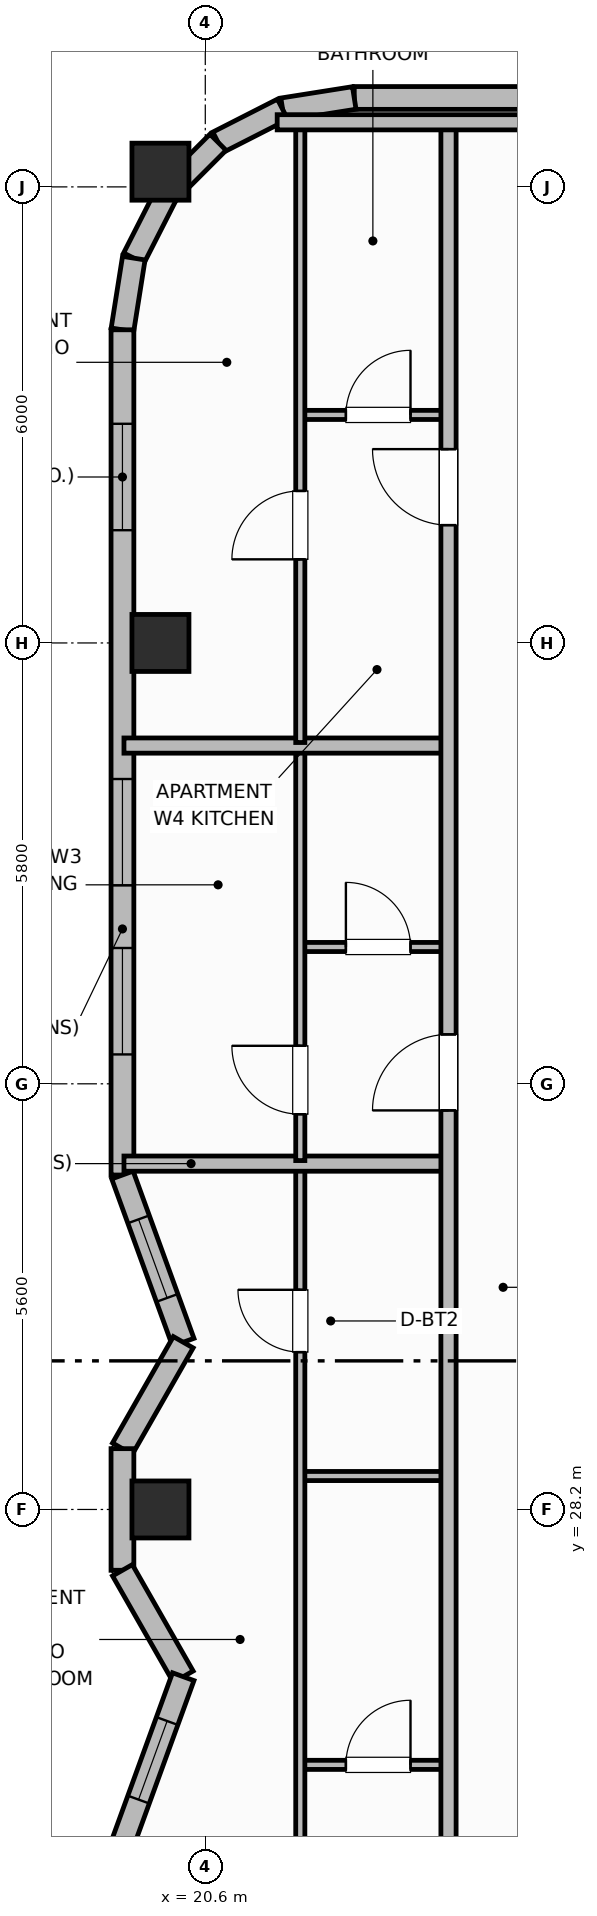
"""IFC4 building model, lengths in metres.
Left out: names, types, materials, properties, quantities, classifications, styles, units other than length and angle.
Written with IfcOpenShell. Run it as: python <this file> out.ifc"""

import sys

from ifc_helpers import new_model, si_unit, direction, frame, frame_2d, origin, origin_2d, place, context, subcontext, project, spatial, rectangle, extrude, element, fill, save


model = new_model("IFC4")
c1 = context("Model", 3, precision=1e-05, world=origin(), true_north=direction((0.0, 1.0)))
c2 = subcontext(c1, "Body", "Model", "MODEL_VIEW")
j1 = project(units=[si_unit("LENGTHUNIT", "METRE"), si_unit("PLANEANGLEUNIT", "RADIAN")], contexts=[c1])
p1 = place(None, origin())
s1 = spatial("IfcSite", under=j1, at=p1, CompositionType="ELEMENT")
p2 = place(p1, origin())
s2 = spatial("IfcBuilding", under=s1, at=p2, CompositionType="ELEMENT")
p3 = place(p2, frame((0.0, 0.0, 271.3)))
s3 = spatial("IfcBuildingStorey", under=s2, at=p3, CompositionType="ELEMENT", Elevation=271.3)
for number, where, z_axis, x_axis in (
    (1, (20.01, 28.2, 0.0), (0.0, 0.0, 1.0), (1.0, 0.0, 0.0)),
    (2, (20.01, 39.6, 0.0), (0.0, 0.0, 1.0), (1.0, 0.0, 0.0)),
    (3, (20.01, 45.8, 0.0), (0.0, 0.0, 1.0), (1.0, 0.0, 0.0)),
):
    element("IfcColumn", number, at=place(p3, frame(where, z_axis=z_axis, x_axis=x_axis)), inside=s3, PredefinedType="COLUMN", context=c2, shape_type="SweptSolid", body=[
        extrude(rectangle(XDim=0.75, YDim=0.75, at=origin_2d()), origin(), (0.0, 0.0, 1.0), 3.7),
    ])
p4 = place(p3, frame((55.84, 46.77, 0.0), z_axis=(0.0, 0.0, 1.0), x_axis=(-1.0, 0.0, 0.0)))
e4 = element("IfcWall", 4, at=p4, inside=s3, PredefinedType="SOLIDWALL", context=c2, shape_type="SweptSolid", body=[
    extrude(rectangle(XDim=33.28, YDim=0.3, at=frame_2d((16.64, 0.0))), origin(), (0.0, 0.0, 1.0), 2.73),
])
p5 = place(p4, frame((4.647, 0.0, 0.71)))
e5 = element("IfcOpeningElement", 5, at=p5, cuts=e4, PredefinedType="OPENING", context=c2, shape_type="SweptSolid", body=[
    extrude(rectangle(XDim=1.6, YDim=1.9, at=frame_2d((0.8, 0.95))), frame((0.0, 0.16, 0.0), z_axis=(0.0, -1.0, 0.0), x_axis=(1.0, 0.0, 0.0)), (0.0, 0.0, 1.0), 0.32),
])
p6 = place(p4, frame((7.845, 0.0, 0.71)))
e6 = element("IfcOpeningElement", 6, at=p6, cuts=e4, PredefinedType="OPENING", context=c2, shape_type="SweptSolid", body=[
    extrude(rectangle(XDim=1.6, YDim=1.9, at=frame_2d((0.8, 0.95))), frame((0.0, 0.16, 0.0), z_axis=(0.0, -1.0, 0.0), x_axis=(1.0, 0.0, 0.0)), (0.0, 0.0, 1.0), 0.32),
])
p7 = place(p4, frame((14.241, 0.0, 0.71)))
e7 = element("IfcOpeningElement", 7, at=p7, cuts=e4, PredefinedType="OPENING", context=c2, shape_type="SweptSolid", body=[
    extrude(rectangle(XDim=1.6, YDim=1.9, at=frame_2d((0.8, 0.95))), frame((0.0, 0.16, 0.0), z_axis=(0.0, -1.0, 0.0), x_axis=(1.0, 0.0, 0.0)), (0.0, 0.0, 1.0), 0.32),
])
p8 = place(p4, frame((17.439, 0.0, 0.71)))
e8 = element("IfcOpeningElement", 8, at=p8, cuts=e4, PredefinedType="OPENING", context=c2, shape_type="SweptSolid", body=[
    extrude(rectangle(XDim=1.6, YDim=1.9, at=frame_2d((0.8, 0.95))), frame((0.0, 0.16, 0.0), z_axis=(0.0, -1.0, 0.0), x_axis=(1.0, 0.0, 0.0)), (0.0, 0.0, 1.0), 0.32),
])
p9 = place(p4, frame((23.835, 0.0, 0.71)))
e9 = element("IfcOpeningElement", 9, at=p9, cuts=e4, PredefinedType="OPENING", context=c2, shape_type="SweptSolid", body=[
    extrude(rectangle(XDim=1.6, YDim=1.9, at=frame_2d((0.8, 0.95))), frame((0.0, 0.16, 0.0), z_axis=(0.0, -1.0, 0.0), x_axis=(1.0, 0.0, 0.0)), (0.0, 0.0, 1.0), 0.32),
])
p10 = place(p4, frame((27.033, 0.0, 0.71)))
e10 = element("IfcOpeningElement", 10, at=p10, cuts=e4, PredefinedType="OPENING", context=c2, shape_type="SweptSolid", body=[
    extrude(rectangle(XDim=1.6, YDim=1.9, at=frame_2d((0.8, 0.95))), frame((0.0, 0.16, 0.0), z_axis=(0.0, -1.0, 0.0), x_axis=(1.0, 0.0, 0.0)), (0.0, 0.0, 1.0), 0.32),
])
p11 = place(p3, frame((22.56, 46.77, 0.0), z_axis=(0.0, 0.0, 1.0), x_axis=(-0.987669453596, -0.156553666304, 0.0)))
e11 = element("IfcWall", 11, at=p11, inside=s3, PredefinedType="SOLIDWALL", context=c2, shape_type="SweptSolid", body=[
    extrude(rectangle(XDim=0.954, YDim=0.3, at=frame_2d((0.477, 0.0))), origin(), (0.0, 0.0, 1.0), 2.73),
])
p12 = place(p3, frame((21.617, 46.621, 0.0), z_axis=(0.0, 0.0, 1.0), x_axis=(-0.891023873617, -0.45395644796, 0.0)))
e12 = element("IfcWall", 12, at=p12, inside=s3, PredefinedType="SOLIDWALL", context=c2, shape_type="SweptSolid", body=[
    extrude(rectangle(XDim=0.954, YDim=0.3, at=frame_2d((0.477, 0.0))), origin(), (0.0, 0.0, 1.0), 2.73),
])
p13 = place(p3, frame((20.767, 46.188, 0.0), z_axis=(0.0, 0.0, 1.0), x_axis=(-0.707106781187, -0.707106781187, 0.0)))
e13 = element("IfcWall", 13, at=p13, inside=s3, PredefinedType="SOLIDWALL", context=c2, shape_type="SweptSolid", body=[
    extrude(rectangle(XDim=0.954, YDim=0.3, at=frame_2d((0.477, 0.0))), origin(), (0.0, 0.0, 1.0), 2.73),
])
p14 = place(p3, frame((20.093, 45.513, 0.0), z_axis=(0.0, 0.0, 1.0), x_axis=(-0.454159573051, -0.890920356825, 0.0)))
e14 = element("IfcWall", 14, at=p14, inside=s3, PredefinedType="SOLIDWALL", context=c2, shape_type="SweptSolid", body=[
    extrude(rectangle(XDim=0.954, YDim=0.3, at=frame_2d((0.477, 0.0))), origin(), (0.0, 0.0, 1.0), 2.73),
])
p15 = place(p3, frame((19.659, 44.663, 0.0), z_axis=(0.0, 0.0, 1.0), x_axis=(-0.156304114255, -0.987708977314, 0.0)))
e15 = element("IfcWall", 15, at=p15, inside=s3, PredefinedType="SOLIDWALL", context=c2, shape_type="SweptSolid", body=[
    extrude(rectangle(XDim=0.954, YDim=0.3, at=frame_2d((0.477, 0.0))), origin(), (0.0, 0.0, 1.0), 2.73),
])
p16 = place(p3, frame((19.51, 43.72, 0.0), z_axis=(0.0, 0.0, 1.0), x_axis=(0.0, -1.0, 0.0)))
e16 = element("IfcWall", 16, at=p16, inside=s3, PredefinedType="SOLIDWALL", context=c2, shape_type="SweptSolid", body=[
    extrude(rectangle(XDim=11.12, YDim=0.3, at=frame_2d((5.56, 0.0))), origin(), (0.0, 0.0, 1.0), 2.73),
])
p17 = place(p16, frame((1.237, 0.0, 0.76)))
e17 = element("IfcOpeningElement", 17, at=p17, cuts=e16, PredefinedType="OPENING", context=c2, shape_type="SweptSolid", body=[
    extrude(rectangle(XDim=1.4, YDim=1.85, at=frame_2d((0.7, 0.925))), frame((0.0, 0.16, 0.0), z_axis=(0.0, -1.0, 0.0), x_axis=(1.0, 0.0, 0.0)), (0.0, 0.0, 1.0), 0.32),
])
p18 = place(p16, frame((5.91, 0.0, 0.76)))
e18 = element("IfcOpeningElement", 18, at=p18, cuts=e16, PredefinedType="OPENING", context=c2, shape_type="SweptSolid", body=[
    extrude(rectangle(XDim=1.4, YDim=1.85, at=frame_2d((0.7, 0.925))), frame((0.0, 0.16, 0.0), z_axis=(0.0, -1.0, 0.0), x_axis=(1.0, 0.0, 0.0)), (0.0, 0.0, 1.0), 0.32),
])
p19 = place(p16, frame((8.133, 0.0, 0.76)))
e19 = element("IfcOpeningElement", 19, at=p19, cuts=e16, PredefinedType="OPENING", context=c2, shape_type="SweptSolid", body=[
    extrude(rectangle(XDim=1.4, YDim=1.85, at=frame_2d((0.7, 0.925))), frame((0.0, 0.16, 0.0), z_axis=(0.0, -1.0, 0.0), x_axis=(1.0, 0.0, 0.0)), (0.0, 0.0, 1.0), 0.32),
])
p20 = place(p3, frame((19.51, 32.6, 0.0), z_axis=(0.0, 0.0, 1.0), x_axis=(0.341734690003, -0.939796468204, 0.0)))
e20 = element("IfcWall", 20, at=p20, inside=s3, PredefinedType="SOLIDWALL", context=c2, shape_type="SweptSolid", body=[
    extrude(rectangle(XDim=2.341, YDim=0.3, at=frame_2d((1.17, 0.0))), origin(), (0.0, 0.0, 1.0), 2.73),
])
p21 = place(p20, frame((0.621, 0.0, 0.92)))
e21 = element("IfcOpeningElement", 21, at=p21, cuts=e20, PredefinedType="OPENING", context=c2, shape_type="SweptSolid", body=[
    extrude(rectangle(XDim=1.1, YDim=1.65, at=frame_2d((0.55, 0.825))), frame((0.0, 0.16, 0.0), z_axis=(0.0, -1.0, 0.0), x_axis=(1.0, 0.0, 0.0)), (0.0, 0.0, 1.0), 0.32),
])
p22 = place(p3, frame((20.31, 30.4, 0.0), z_axis=(0.0, 0.0, 1.0), x_axis=(-0.496187856351, -0.868215187157, 0.0)))
e22 = element("IfcWall", 22, at=p22, inside=s3, PredefinedType="SOLIDWALL", context=c2, shape_type="SweptSolid", body=[
    extrude(rectangle(XDim=1.612, YDim=0.3, at=frame_2d((0.806, 0.0))), origin(), (0.0, 0.0, 1.0), 2.73),
])
p23 = place(p3, frame((19.51, 29.0, 0.0), z_axis=(0.0, 0.0, 1.0), x_axis=(0.0, -1.0, 0.0)))
e23 = element("IfcWall", 23, at=p23, inside=s3, PredefinedType="SOLIDWALL", context=c2, shape_type="SweptSolid", body=[
    extrude(rectangle(XDim=1.6, YDim=0.3, at=frame_2d((0.8, 0.0))), origin(), (0.0, 0.0, 1.0), 2.73),
])
p24 = place(p3, frame((19.51, 27.4, 0.0), z_axis=(0.0, 0.0, 1.0), x_axis=(0.496187856351, -0.868215187157, 0.0)))
e24 = element("IfcWall", 24, at=p24, inside=s3, PredefinedType="SOLIDWALL", context=c2, shape_type="SweptSolid", body=[
    extrude(rectangle(XDim=1.612, YDim=0.3, at=frame_2d((0.806, 0.0))), origin(), (0.0, 0.0, 1.0), 2.73),
])
p25 = place(p3, frame((20.31, 26.0, 0.0), z_axis=(0.0, 0.0, 1.0), x_axis=(-0.341768184638, -0.939784287999, 0.0)))
e25 = element("IfcWall", 25, at=p25, inside=s3, PredefinedType="SOLIDWALL", context=c2, shape_type="SweptSolid", body=[
    extrude(rectangle(XDim=2.341, YDim=0.3, at=frame_2d((1.17, 0.0))), origin(), (0.0, 0.0, 1.0), 2.73),
])
p26 = place(p25, frame((0.621, 0.0, 0.92)))
e26 = element("IfcOpeningElement", 26, at=p26, cuts=e25, PredefinedType="OPENING", context=c2, shape_type="SweptSolid", body=[
    extrude(rectangle(XDim=1.1, YDim=1.65, at=frame_2d((0.55, 0.825))), frame((0.0, 0.16, 0.0), z_axis=(0.0, -1.0, 0.0), x_axis=(1.0, 0.0, 0.0)), (0.0, 0.0, 1.0), 0.32),
])
p27 = place(p3, frame((21.85, 24.84, 0.0), z_axis=(0.0, 0.0, 1.0), x_axis=(1.0, 0.0, 0.0)))
e27 = element("IfcWall", 27, at=p27, inside=s3, PredefinedType="PARTITIONING", context=c2, shape_type="SweptSolid", body=[
    extrude(rectangle(XDim=1.95, YDim=0.12, at=frame_2d((0.975, 0.0))), origin(), (0.0, 0.0, 1.0), 2.56),
])
p28 = place(p27, frame((0.6, 0.0, 0.0)))
e28 = element("IfcOpeningElement", 28, at=p28, cuts=e27, PredefinedType="OPENING", context=c2, shape_type="SweptSolid", body=[
    extrude(rectangle(XDim=0.85, YDim=2.1, at=frame_2d((0.425, 1.05))), frame((0.0, 0.07, 0.0), z_axis=(0.0, -1.0, 0.0), x_axis=(1.0, 0.0, 0.0)), (0.0, 0.0, 1.0), 0.14),
])
p29 = place(p3, frame((21.85, 28.64, 0.0), z_axis=(0.0, 0.0, 1.0), x_axis=(1.0, 0.0, 0.0)))
e29 = element("IfcWall", 29, at=p29, inside=s3, PredefinedType="PARTITIONING", context=c2, shape_type="SweptSolid", body=[
    extrude(rectangle(XDim=1.95, YDim=0.12, at=frame_2d((0.975, 0.0))), origin(), (0.0, 0.0, 1.0), 2.56),
])
p30 = place(p3, frame((21.85, 19.48, 0.0), z_axis=(0.0, 0.0, 1.0), x_axis=(0.0, 1.0, 0.0)))
e30 = element("IfcWall", 30, at=p30, inside=s3, PredefinedType="PARTITIONING", context=c2, shape_type="SweptSolid", body=[
    extrude(rectangle(XDim=13.23, YDim=0.12, at=frame_2d((6.615, 0.0))), origin(), (0.0, 0.0, 1.0), 2.56),
])
p31 = place(p30, frame((0.61, 0.0, 0.0)))
e31 = element("IfcOpeningElement", 31, at=p31, cuts=e30, PredefinedType="OPENING", context=c2, shape_type="SweptSolid", body=[
    extrude(rectangle(XDim=0.9, YDim=2.1, at=frame_2d((0.45, 1.05))), frame((0.0, 0.07, 0.0), z_axis=(0.0, -1.0, 0.0), x_axis=(1.0, 0.0, 0.0)), (0.0, 0.0, 1.0), 0.14),
])
p32 = place(p30, frame((10.79, 0.0, 0.0)))
e32 = element("IfcOpeningElement", 32, at=p32, cuts=e30, PredefinedType="OPENING", context=c2, shape_type="SweptSolid", body=[
    extrude(rectangle(XDim=0.82, YDim=2.08, at=frame_2d((0.41, 1.04))), frame((0.0, 0.07, 0.0), z_axis=(0.0, -1.0, 0.0), x_axis=(1.0, 0.0, 0.0)), (0.0, 0.0, 1.0), 0.14),
])
p33 = place(p3, frame((19.53, 32.75, 0.0), z_axis=(0.0, 0.0, 1.0), x_axis=(1.0, 0.0, 0.0)))
e33 = element("IfcWall", 33, at=p33, inside=s3, PredefinedType="PARTITIONING", context=c2, shape_type="SweptSolid", body=[
    extrude(rectangle(XDim=4.27, YDim=0.2, at=frame_2d((2.135, 0.0))), origin(), (0.0, 0.0, 1.0), 2.56),
])
p34 = place(p3, frame((21.85, 35.6, 0.0), z_axis=(0.0, 0.0, 1.0), x_axis=(1.0, 0.0, 0.0)))
e34 = element("IfcWall", 34, at=p34, inside=s3, PredefinedType="PARTITIONING", context=c2, shape_type="SweptSolid", body=[
    extrude(rectangle(XDim=1.95, YDim=0.12, at=frame_2d((0.975, 0.0))), origin(), (0.0, 0.0, 1.0), 2.56),
])
p35 = place(p34, frame((0.6, 0.0, 0.0)))
e35 = element("IfcOpeningElement", 35, at=p35, cuts=e34, PredefinedType="OPENING", context=c2, shape_type="SweptSolid", body=[
    extrude(rectangle(XDim=0.85, YDim=2.1, at=frame_2d((0.425, 1.05))), frame((0.0, 0.07, 0.0), z_axis=(0.0, -1.0, 0.0), x_axis=(1.0, 0.0, 0.0)), (0.0, 0.0, 1.0), 0.14),
])
p36 = place(p3, frame((21.85, 32.79, 0.0), z_axis=(0.0, 0.0, 1.0), x_axis=(0.0, 1.0, 0.0)))
e36 = element("IfcWall", 36, at=p36, inside=s3, PredefinedType="PARTITIONING", context=c2, shape_type="SweptSolid", body=[
    extrude(rectangle(XDim=5.42, YDim=0.12, at=frame_2d((2.71, 0.0))), origin(), (0.0, 0.0, 1.0), 2.56),
])
p37 = place(p36, frame((0.61, 0.0, 0.0)))
e37 = element("IfcOpeningElement", 37, at=p37, cuts=e36, PredefinedType="OPENING", context=c2, shape_type="SweptSolid", body=[
    extrude(rectangle(XDim=0.9, YDim=2.1, at=frame_2d((0.45, 1.05))), frame((0.0, 0.07, 0.0), z_axis=(0.0, -1.0, 0.0), x_axis=(1.0, 0.0, 0.0)), (0.0, 0.0, 1.0), 0.14),
])
p38 = place(p3, frame((19.53, 38.25, 0.0), z_axis=(0.0, 0.0, 1.0), x_axis=(1.0, 0.0, 0.0)))
e38 = element("IfcWall", 38, at=p38, inside=s3, PredefinedType="PARTITIONING", context=c2, shape_type="SweptSolid", body=[
    extrude(rectangle(XDim=4.27, YDim=0.2, at=frame_2d((2.135, 0.0))), origin(), (0.0, 0.0, 1.0), 2.56),
])
p39 = place(p3, frame((21.85, 42.6, 0.0), z_axis=(0.0, 0.0, 1.0), x_axis=(1.0, 0.0, 0.0)))
e39 = element("IfcWall", 39, at=p39, inside=s3, PredefinedType="PARTITIONING", context=c2, shape_type="SweptSolid", body=[
    extrude(rectangle(XDim=1.95, YDim=0.12, at=frame_2d((0.975, 0.0))), origin(), (0.0, 0.0, 1.0), 2.56),
])
p40 = place(p39, frame((0.6, 0.0, 0.0)))
e40 = element("IfcOpeningElement", 40, at=p40, cuts=e39, PredefinedType="OPENING", context=c2, shape_type="SweptSolid", body=[
    extrude(rectangle(XDim=0.85, YDim=2.1, at=frame_2d((0.425, 1.05))), frame((0.0, 0.07, 0.0), z_axis=(0.0, -1.0, 0.0), x_axis=(1.0, 0.0, 0.0)), (0.0, 0.0, 1.0), 0.14),
])
p41 = place(p3, frame((21.85, 38.29, 0.0), z_axis=(0.0, 0.0, 1.0), x_axis=(0.0, 1.0, 0.0)))
e41 = element("IfcWall", 41, at=p41, inside=s3, PredefinedType="PARTITIONING", context=c2, shape_type="SweptSolid", body=[
    extrude(rectangle(XDim=8.12, YDim=0.12, at=frame_2d((4.06, 0.0))), origin(), (0.0, 0.0, 1.0), 2.56),
])
p42 = place(p41, frame((2.41, 0.0, 0.0)))
e42 = element("IfcOpeningElement", 42, at=p42, cuts=e41, PredefinedType="OPENING", context=c2, shape_type="SweptSolid", body=[
    extrude(rectangle(XDim=0.9, YDim=2.1, at=frame_2d((0.45, 1.05))), frame((0.0, 0.07, 0.0), z_axis=(0.0, -1.0, 0.0), x_axis=(1.0, 0.0, 0.0)), (0.0, 0.0, 1.0), 0.14),
])
p43 = place(p3, frame((23.8, 9.95, 0.0), z_axis=(0.0, 0.0, 1.0), x_axis=(0.0, 1.0, 0.0)))
e43 = element("IfcWall", 43, at=p43, inside=s3, PredefinedType="PARTITIONING", context=c2, shape_type="SweptSolid", body=[
    extrude(rectangle(XDim=36.5, YDim=0.2, at=frame_2d((18.25, 0.0))), origin(), (0.0, 0.0, 1.0), 2.56),
])
p44 = place(p43, frame((3.11, 0.0, 0.0)))
e44 = element("IfcOpeningElement", 44, at=p44, cuts=e43, PredefinedType="OPENING", context=c2, shape_type="SweptSolid", body=[
    extrude(rectangle(XDim=1.0, YDim=2.15, at=frame_2d((0.5, 1.075))), frame((0.0, 0.11, 0.0), z_axis=(0.0, -1.0, 0.0), x_axis=(1.0, 0.0, 0.0)), (0.0, 0.0, 1.0), 0.22),
])
p45 = place(p43, frame((11.99, 0.0, 0.0)))
e45 = element("IfcOpeningElement", 45, at=p45, cuts=e43, PredefinedType="OPENING", context=c2, shape_type="SweptSolid", body=[
    extrude(rectangle(XDim=1.0, YDim=2.15, at=frame_2d((0.5, 1.075))), frame((0.0, 0.11, 0.0), z_axis=(0.0, -1.0, 0.0), x_axis=(1.0, 0.0, 0.0)), (0.0, 0.0, 1.0), 0.22),
])
p46 = place(p43, frame((23.5, 0.0, 0.0)))
e46 = element("IfcOpeningElement", 46, at=p46, cuts=e43, PredefinedType="OPENING", context=c2, shape_type="SweptSolid", body=[
    extrude(rectangle(XDim=1.0, YDim=2.15, at=frame_2d((0.5, 1.075))), frame((0.0, 0.11, 0.0), z_axis=(0.0, -1.0, 0.0), x_axis=(1.0, 0.0, 0.0)), (0.0, 0.0, 1.0), 0.22),
])
p47 = place(p43, frame((31.2, 0.0, 0.0)))
e47 = element("IfcOpeningElement", 47, at=p47, cuts=e43, PredefinedType="OPENING", context=c2, shape_type="SweptSolid", body=[
    extrude(rectangle(XDim=1.0, YDim=2.15, at=frame_2d((0.5, 1.075))), frame((0.0, 0.11, 0.0), z_axis=(0.0, -1.0, 0.0), x_axis=(1.0, 0.0, 0.0)), (0.0, 0.0, 1.0), 0.22),
])
p48 = place(p3, frame((21.546, 46.45, 0.0), z_axis=(0.0, 0.0, 1.0), x_axis=(1.0, 0.0, 0.0)))
e48 = element("IfcWall", 48, at=p48, inside=s3, PredefinedType="PARTITIONING", context=c2, shape_type="SweptSolid", body=[
    extrude(rectangle(XDim=3.754, YDim=0.2, at=frame_2d((1.877, 0.0))), origin(), (0.0, 0.0, 1.0), 2.56),
])
p49 = place(p17, origin())
e49 = element("IfcWindow", 49, at=p49, inside=s3, PartitioningType="SINGLE_PANEL", PredefinedType="WINDOW", context=c2, shape_type="SweptSolid", body=[
    extrude(rectangle(XDim=1.4, YDim=1.85, at=frame_2d((0.7, 0.925))), frame((0.0, 0.03, 0.0), z_axis=(0.0, -1.0, 0.0), x_axis=(1.0, 0.0, 0.0)), (0.0, 0.0, 1.0), 0.06),
])
fill(e17, e49)
p50 = place(p18, origin())
e50 = element("IfcWindow", 50, at=p50, inside=s3, PartitioningType="SINGLE_PANEL", PredefinedType="WINDOW", context=c2, shape_type="SweptSolid", body=[
    extrude(rectangle(XDim=1.4, YDim=1.85, at=frame_2d((0.7, 0.925))), frame((0.0, 0.03, 0.0), z_axis=(0.0, -1.0, 0.0), x_axis=(1.0, 0.0, 0.0)), (0.0, 0.0, 1.0), 0.06),
])
fill(e18, e50)
p51 = place(p19, origin())
e51 = element("IfcWindow", 51, at=p51, inside=s3, PartitioningType="SINGLE_PANEL", PredefinedType="WINDOW", context=c2, shape_type="SweptSolid", body=[
    extrude(rectangle(XDim=1.4, YDim=1.85, at=frame_2d((0.7, 0.925))), frame((0.0, 0.03, 0.0), z_axis=(0.0, -1.0, 0.0), x_axis=(1.0, 0.0, 0.0)), (0.0, 0.0, 1.0), 0.06),
])
fill(e19, e51)
p52 = place(p21, origin())
e52 = element("IfcWindow", 52, at=p52, inside=s3, PartitioningType="SINGLE_PANEL", PredefinedType="WINDOW", context=c2, shape_type="SweptSolid", body=[
    extrude(rectangle(XDim=1.1, YDim=1.65, at=frame_2d((0.55, 0.825))), frame((0.0, 0.03, 0.0), z_axis=(0.0, -1.0, 0.0), x_axis=(1.0, 0.0, 0.0)), (0.0, 0.0, 1.0), 0.06),
])
fill(e21, e52)
p53 = place(p26, origin())
e53 = element("IfcWindow", 53, at=p53, inside=s3, PartitioningType="SINGLE_PANEL", PredefinedType="WINDOW", context=c2, shape_type="SweptSolid", body=[
    extrude(rectangle(XDim=1.1, YDim=1.65, at=frame_2d((0.55, 0.825))), frame((0.0, 0.03, 0.0), z_axis=(0.0, -1.0, 0.0), x_axis=(1.0, 0.0, 0.0)), (0.0, 0.0, 1.0), 0.06),
])
fill(e26, e53)
p54 = place(p28, origin())
e54 = element("IfcDoor", 54, at=p54, inside=s3, OperationType="SINGLE_SWING_RIGHT", PredefinedType="DOOR", context=c2, shape_type="SweptSolid", body=[
    extrude(rectangle(XDim=0.85, YDim=2.1, at=frame_2d((0.425, 1.05))), frame((0.0, 0.025, 0.0), z_axis=(0.0, -1.0, 0.0), x_axis=(1.0, 0.0, 0.0)), (0.0, 0.0, 1.0), 0.05),
])
fill(e28, e54)
p55 = place(p32, origin())
e55 = element("IfcDoor", 55, at=p55, inside=s3, OperationType="SINGLE_SWING_RIGHT", PredefinedType="DOOR", context=c2, shape_type="SweptSolid", body=[
    extrude(rectangle(XDim=0.82, YDim=2.08, at=frame_2d((0.41, 1.04))), frame((0.0, 0.025, 0.0), z_axis=(0.0, -1.0, 0.0), x_axis=(1.0, 0.0, 0.0)), (0.0, 0.0, 1.0), 0.05),
])
fill(e32, e55)
p56 = place(p35, origin())
e56 = element("IfcDoor", 56, at=p56, inside=s3, OperationType="SINGLE_SWING_LEFT", PredefinedType="DOOR", context=c2, shape_type="SweptSolid", body=[
    extrude(rectangle(XDim=0.85, YDim=2.1, at=frame_2d((0.425, 1.05))), frame((0.0, 0.025, 0.0), z_axis=(0.0, -1.0, 0.0), x_axis=(1.0, 0.0, 0.0)), (0.0, 0.0, 1.0), 0.05),
])
fill(e35, e56)
p57 = place(p37, origin())
e57 = element("IfcDoor", 57, at=p57, inside=s3, OperationType="SINGLE_SWING_RIGHT", PredefinedType="DOOR", context=c2, shape_type="SweptSolid", body=[
    extrude(rectangle(XDim=0.9, YDim=2.1, at=frame_2d((0.45, 1.05))), frame((0.0, 0.025, 0.0), z_axis=(0.0, -1.0, 0.0), x_axis=(1.0, 0.0, 0.0)), (0.0, 0.0, 1.0), 0.05),
])
fill(e37, e57)
p58 = place(p40, origin())
e58 = element("IfcDoor", 58, at=p58, inside=s3, OperationType="SINGLE_SWING_RIGHT", PredefinedType="DOOR", context=c2, shape_type="SweptSolid", body=[
    extrude(rectangle(XDim=0.85, YDim=2.1, at=frame_2d((0.425, 1.05))), frame((0.0, 0.025, 0.0), z_axis=(0.0, -1.0, 0.0), x_axis=(1.0, 0.0, 0.0)), (0.0, 0.0, 1.0), 0.05),
])
fill(e40, e58)
p59 = place(p42, origin())
e59 = element("IfcDoor", 59, at=p59, inside=s3, OperationType="SINGLE_SWING_LEFT", PredefinedType="DOOR", context=c2, shape_type="SweptSolid", body=[
    extrude(rectangle(XDim=0.9, YDim=2.1, at=frame_2d((0.45, 1.05))), frame((0.0, 0.025, 0.0), z_axis=(0.0, -1.0, 0.0), x_axis=(1.0, 0.0, 0.0)), (0.0, 0.0, 1.0), 0.05),
])
fill(e42, e59)
p60 = place(p46, origin())
e60 = element("IfcDoor", 60, at=p60, inside=s3, OperationType="SINGLE_SWING_LEFT", PredefinedType="DOOR", context=c2, shape_type="SweptSolid", body=[
    extrude(rectangle(XDim=1.0, YDim=2.15, at=frame_2d((0.5, 1.075))), frame((0.0, 0.025, 0.0), z_axis=(0.0, -1.0, 0.0), x_axis=(1.0, 0.0, 0.0)), (0.0, 0.0, 1.0), 0.05),
])
fill(e46, e60)
p61 = place(p47, origin())
e61 = element("IfcDoor", 61, at=p61, inside=s3, OperationType="SINGLE_SWING_RIGHT", PredefinedType="DOOR", context=c2, shape_type="SweptSolid", body=[
    extrude(rectangle(XDim=1.0, YDim=2.15, at=frame_2d((0.5, 1.075))), frame((0.0, 0.025, 0.0), z_axis=(0.0, -1.0, 0.0), x_axis=(1.0, 0.0, 0.0)), (0.0, 0.0, 1.0), 0.05),
])
fill(e47, e61)
save(model, sys.argv[1])
